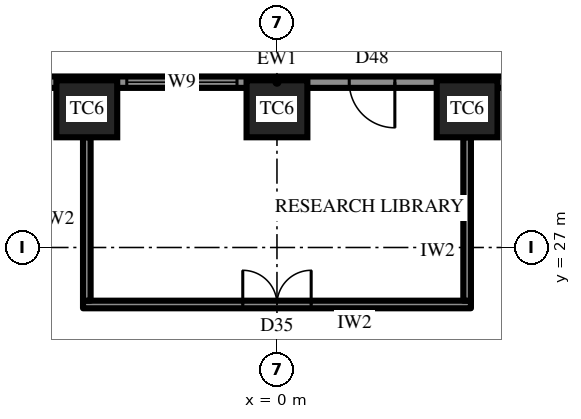
"""IFC4 building model, lengths in metres.
Left out: names, types, materials, properties, quantities, classifications, styles, units other than length and angle.
Written with IfcOpenShell. Run it as: python <this file> out.ifc"""

import sys

from ifc_helpers import new_model, si_unit, direction, frame, frame_2d, origin, origin_2d, place, context, subcontext, project, spatial, rectangle, extrude, element, fill, save


model = new_model("IFC4")
c1 = context("Model", 3, precision=1e-05, world=origin(), true_north=direction((0.0, 1.0)))
c2 = subcontext(c1, "Body", "Model", "MODEL_VIEW")
j1 = project(units=[si_unit("LENGTHUNIT", "METRE"), si_unit("PLANEANGLEUNIT", "RADIAN")], contexts=[c1])
p1 = place(None, origin())
s1 = spatial("IfcSite", under=j1, at=p1, CompositionType="ELEMENT")
p2 = place(p1, origin())
s2 = spatial("IfcBuilding", under=s1, at=p2, CompositionType="ELEMENT")
p3 = place(p2, frame((0.0, 0.0, 157.3)))
s3 = spatial("IfcBuildingStorey", under=s2, at=p3, CompositionType="ELEMENT", Elevation=157.3)
for number, where, z_axis, x_axis in (
    (1, (5.004, 30.65, 0.0), (0.0, 0.0, 1.0), (-1.0, 0.0, 0.0)),
    (2, (0.0, 30.65, 0.0), (0.0, 0.0, 1.0), (-1.0, 0.0, 0.0)),
    (3, (-5.004, 30.65, 0.0), (0.0, 0.0, 1.0), (-1.0, 0.0, 0.0)),
):
    element("IfcColumn", number, at=place(p3, frame(where, z_axis=z_axis, x_axis=x_axis)), inside=s3, PredefinedType="COLUMN", context=c2, shape_type="SweptSolid", body=[
        extrude(rectangle(XDim=1.6, YDim=1.5, at=origin_2d()), origin(), (0.0, 0.0, 1.0), 4.2),
    ])
p4 = place(p3, frame((15.011, 31.35, 0.0), z_axis=(0.0, 0.0, 1.0), x_axis=(-1.0, 0.0, 0.0)))
e4 = element("IfcWall", 4, at=p4, inside=s3, PredefinedType="SOLIDWALL", context=c2, shape_type="SweptSolid", body=[
    extrude(rectangle(XDim=30.022, YDim=0.3, at=frame_2d((15.011, 0.0))), origin(), (0.0, 0.0, 1.0), 2.75),
])
p5 = place(p4, frame((1.052, 0.0, 0.6)))
e5 = element("IfcOpeningElement", 5, at=p5, cuts=e4, PredefinedType="OPENING", context=c2, shape_type="SweptSolid", body=[
    extrude(rectangle(XDim=2.9, YDim=1.9, at=frame_2d((1.45, 0.95))), frame((0.0, 0.16, 0.0), z_axis=(0.0, -1.0, 0.0), x_axis=(1.0, 0.0, 0.0)), (0.0, 0.0, 1.0), 0.32),
])
p6 = place(p4, frame((6.056, 0.0, 0.6)))
e6 = element("IfcOpeningElement", 6, at=p6, cuts=e4, PredefinedType="OPENING", context=c2, shape_type="SweptSolid", body=[
    extrude(rectangle(XDim=2.9, YDim=1.9, at=frame_2d((1.45, 0.95))), frame((0.0, 0.16, 0.0), z_axis=(0.0, -1.0, 0.0), x_axis=(1.0, 0.0, 0.0)), (0.0, 0.0, 1.0), 0.32),
])
p7 = place(p4, frame((11.909, 0.0, 0.0)))
e7 = element("IfcOpeningElement", 7, at=p7, cuts=e4, PredefinedType="OPENING", context=c2, shape_type="SweptSolid", body=[
    extrude(rectangle(XDim=1.2, YDim=2.4, at=frame_2d((0.6, 1.2))), frame((0.0, 0.16, 0.0), z_axis=(0.0, -1.0, 0.0), x_axis=(1.0, 0.0, 0.0)), (0.0, 0.0, 1.0), 0.32),
])
p8 = place(p4, frame((16.063, 0.0, 0.6)))
e8 = element("IfcOpeningElement", 8, at=p8, cuts=e4, PredefinedType="OPENING", context=c2, shape_type="SweptSolid", body=[
    extrude(rectangle(XDim=2.9, YDim=1.9, at=frame_2d((1.45, 0.95))), frame((0.0, 0.16, 0.0), z_axis=(0.0, -1.0, 0.0), x_axis=(1.0, 0.0, 0.0)), (0.0, 0.0, 1.0), 0.32),
])
p9 = place(p4, frame((21.067, 0.0, 0.6)))
e9 = element("IfcOpeningElement", 9, at=p9, cuts=e4, PredefinedType="OPENING", context=c2, shape_type="SweptSolid", body=[
    extrude(rectangle(XDim=2.9, YDim=1.9, at=frame_2d((1.45, 0.95))), frame((0.0, 0.16, 0.0), z_axis=(0.0, -1.0, 0.0), x_axis=(1.0, 0.0, 0.0)), (0.0, 0.0, 1.0), 0.32),
])
p10 = place(p4, frame((26.07, 0.0, 0.6)))
e10 = element("IfcOpeningElement", 10, at=p10, cuts=e4, PredefinedType="OPENING", context=c2, shape_type="SweptSolid", body=[
    extrude(rectangle(XDim=2.9, YDim=1.9, at=frame_2d((1.45, 0.95))), frame((0.0, 0.16, 0.0), z_axis=(0.0, -1.0, 0.0), x_axis=(1.0, 0.0, 0.0)), (0.0, 0.0, 1.0), 0.32),
])
p11 = place(p3, frame((5.104, 25.5, 0.0), z_axis=(0.0, 0.0, 1.0), x_axis=(-1.0, 0.0, 0.0)))
e11 = element("IfcWall", 11, at=p11, inside=s3, PredefinedType="PARTITIONING", context=c2, shape_type="SweptSolid", body=[
    extrude(rectangle(XDim=10.208, YDim=0.2, at=frame_2d((5.104, 0.0))), origin(), (0.0, 0.0, 1.0), 4.0),
])
p12 = place(p11, frame((4.204, 0.0, 0.0)))
e12 = element("IfcOpeningElement", 12, at=p12, cuts=e11, PredefinedType="OPENING", context=c2, shape_type="SweptSolid", body=[
    extrude(rectangle(XDim=1.8, YDim=2.4, at=frame_2d((0.9, 1.2))), frame((0.0, 0.11, 0.0), z_axis=(0.0, -1.0, 0.0), x_axis=(1.0, 0.0, 0.0)), (0.0, 0.0, 1.0), 0.22),
])
for number, where, z_axis, x_axis in (
    (13, (5.004, 25.6, 0.0), (0.0, 0.0, 1.0), (0.0, 1.0, 0.0)),
    (14, (-5.004, 25.6, 0.0), (0.0, 0.0, 1.0), (0.0, 1.0, 0.0)),
):
    element("IfcWall", number, at=place(p3, frame(where, z_axis=z_axis, x_axis=x_axis)), inside=s3, PredefinedType="PARTITIONING", context=c2, shape_type="SweptSolid", body=[
        extrude(rectangle(XDim=4.3, YDim=0.2, at=frame_2d((2.15, 0.0))), origin(), (0.0, 0.0, 1.0), 2.992),
    ])
p13 = place(p7, origin())
e15 = element("IfcDoor", 15, at=p13, inside=s3, OperationType="SINGLE_SWING_RIGHT", PredefinedType="DOOR", context=c2, shape_type="SweptSolid", body=[
    extrude(rectangle(XDim=1.2, YDim=2.4, at=frame_2d((0.6, 1.2))), frame((0.0, 0.025, 0.0), z_axis=(0.0, -1.0, 0.0), x_axis=(1.0, 0.0, 0.0)), (0.0, 0.0, 1.0), 0.05),
])
fill(e7, e15)
p14 = place(p8, origin())
e16 = element("IfcWindow", 16, at=p14, inside=s3, PartitioningType="SINGLE_PANEL", PredefinedType="WINDOW", context=c2, shape_type="SweptSolid", body=[
    extrude(rectangle(XDim=2.9, YDim=1.9, at=frame_2d((1.45, 0.95))), frame((0.0, 0.03, 0.0), z_axis=(0.0, -1.0, 0.0), x_axis=(1.0, 0.0, 0.0)), (0.0, 0.0, 1.0), 0.06),
])
fill(e8, e16)
p15 = place(p12, frame((1.8, 0.0, 0.0), z_axis=(0.0, 0.0, 1.0), x_axis=(-1.0, 0.0, 0.0)))
e17 = element("IfcDoor", 17, at=p15, inside=s3, OperationType="DOUBLE_DOOR_SINGLE_SWING", PredefinedType="DOOR", context=c2, shape_type="SweptSolid", body=[
    extrude(rectangle(XDim=1.8, YDim=2.4, at=frame_2d((0.9, 1.2))), frame((0.0, 0.025, 0.0), z_axis=(0.0, -1.0, 0.0), x_axis=(1.0, 0.0, 0.0)), (0.0, 0.0, 1.0), 0.05),
])
fill(e12, e17)
save(model, sys.argv[1])
